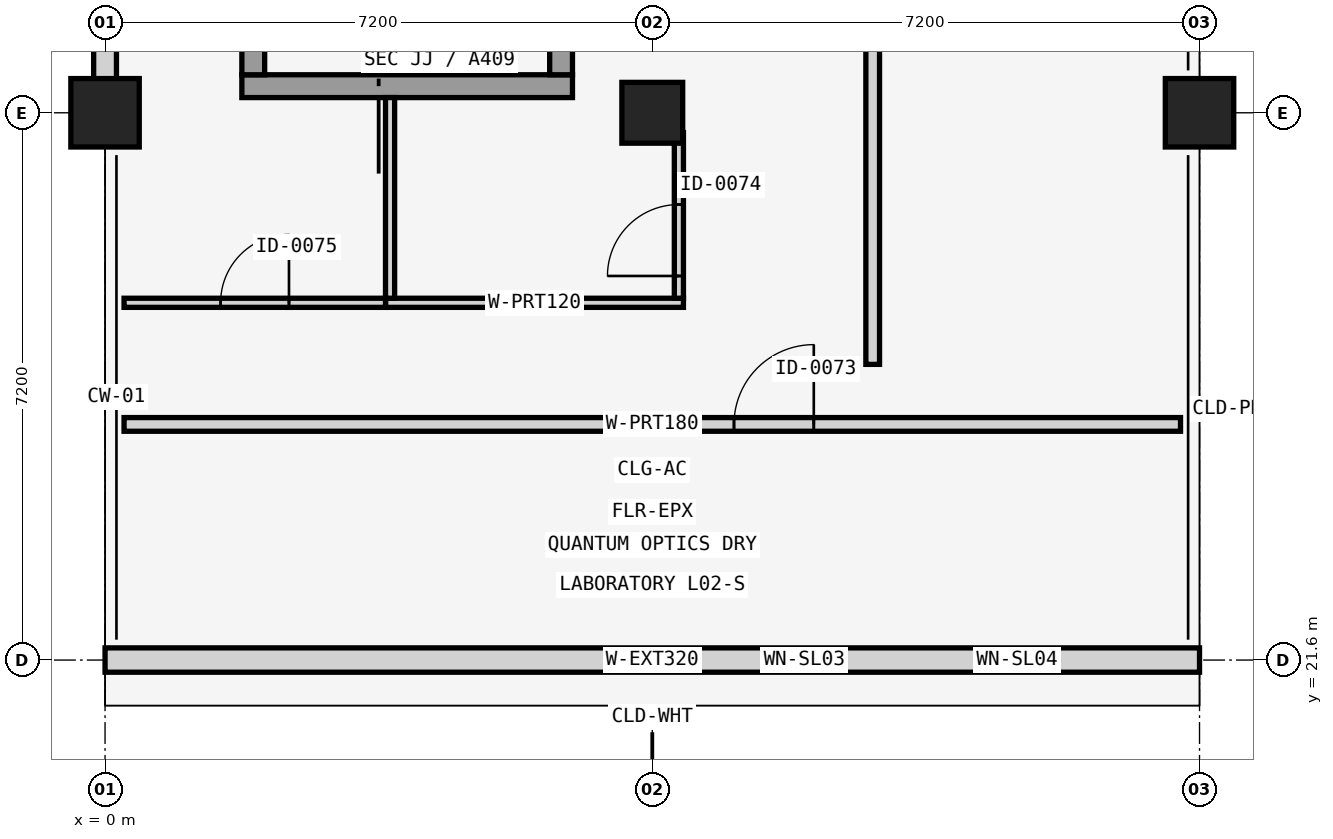
"""IFC4 building model, lengths in metres.
Left out: names, types, materials, properties, quantities, classifications, styles, units other than length and angle.
Written with IfcOpenShell. Run it as: python <this file> out.ifc"""

import sys

from ifc_helpers import new_model, si_unit, direction, frame, frame_2d, origin, origin_2d, place, context, subcontext, project, spatial, rectangle, extrude, element, fill, save


model = new_model("IFC4")
c1 = context("Model", 3, precision=1e-05, world=origin(), true_north=direction((0.0, 1.0)))
c2 = subcontext(c1, "Body", "Model", "MODEL_VIEW")
j1 = project(units=[si_unit("LENGTHUNIT", "METRE"), si_unit("PLANEANGLEUNIT", "RADIAN")], contexts=[c1])
p1 = place(None, origin())
s1 = spatial("IfcSite", under=j1, at=p1, CompositionType="ELEMENT")
p2 = place(p1, origin())
s2 = spatial("IfcBuilding", under=s1, at=p2, CompositionType="ELEMENT")
p3 = place(p2, frame((0.0, 0.0, 8.96)))
s3 = spatial("IfcBuildingStorey", under=s2, at=p3, CompositionType="ELEMENT", Elevation=8.96)
p4 = place(p3, frame((0.0, 28.8, 0.0), z_axis=(0.0, 0.0, 1.0), x_axis=(1.0, 0.0, 0.0)))
e1 = element("IfcColumn", 1, at=p4, inside=s3, PredefinedType="COLUMN", context=c2, shape_type="SweptSolid", body=[
    extrude(rectangle(XDim=0.9, YDim=0.9, at=origin_2d()), origin(), (0.0, 0.0, 1.0), 4.16),
])
p5 = place(p3, frame((7.2, 28.8, 0.0), z_axis=(0.0, 0.0, 1.0), x_axis=(1.0, 0.0, 0.0)))
e2 = element("IfcColumn", 2, at=p5, inside=s3, PredefinedType="COLUMN", context=c2, shape_type="SweptSolid", body=[
    extrude(rectangle(XDim=0.8, YDim=0.8, at=origin_2d()), origin(), (0.0, 0.0, 1.0), 4.16),
])
p6 = place(p3, frame((14.4, 28.8, 0.0), z_axis=(0.0, 0.0, 1.0), x_axis=(1.0, 0.0, 0.0)))
e3 = element("IfcColumn", 3, at=p6, inside=s3, PredefinedType="COLUMN", context=c2, shape_type="SweptSolid", body=[
    extrude(rectangle(XDim=0.9, YDim=0.9, at=origin_2d()), origin(), (0.0, 0.0, 1.0), 4.16),
])
p7 = place(p3, frame((0.0, 21.6, 0.0), z_axis=(0.0, 0.0, 1.0), x_axis=(1.0, 0.0, 0.0)))
e4 = element("IfcWall", 4, at=p7, inside=s3, PredefinedType="SOLIDWALL", context=c2, shape_type="SweptSolid", body=[
    extrude(rectangle(XDim=14.4, YDim=0.32, at=frame_2d((7.2, 0.0))), origin(), (0.0, 0.0, 1.0), 2.81),
])
p8 = place(p7, frame((8.925, 0.0, 0.45)))
e5 = element("IfcOpeningElement", 5, at=p8, cuts=e4, PredefinedType="OPENING", context=c2, shape_type="SweptSolid", body=[
    extrude(rectangle(XDim=0.55, YDim=2.2, at=frame_2d((0.275, 1.1))), frame((0.0, 0.17, 0.0), z_axis=(0.0, -1.0, 0.0), x_axis=(1.0, 0.0, 0.0)), (0.0, 0.0, 1.0), 0.34),
])
p9 = place(p7, frame((11.775, 0.0, 0.55)))
e6 = element("IfcOpeningElement", 6, at=p9, cuts=e4, PredefinedType="OPENING", context=c2, shape_type="SweptSolid", body=[
    extrude(rectangle(XDim=0.45, YDim=2.1, at=frame_2d((0.225, 1.05))), frame((0.0, 0.17, 0.0), z_axis=(0.0, -1.0, 0.0), x_axis=(1.0, 0.0, 0.0)), (0.0, 0.0, 1.0), 0.34),
])
p10 = place(p3, frame((0.0, 29.24, 0.0), z_axis=(0.0, 0.0, 1.0), x_axis=(0.0, 1.0, 0.0)))
e7 = element("IfcWall", 7, at=p10, inside=s3, PredefinedType="SOLIDWALL", context=c2, shape_type="SweptSolid", body=[
    extrude(rectangle(XDim=6.32, YDim=0.3, at=frame_2d((3.16, 0.0))), origin(), (0.0, 0.0, 1.0), 2.81),
])
p11 = place(p3, frame((1.8, 29.15, 0.0), z_axis=(0.0, 0.0, 1.0), x_axis=(1.0, 0.0, 0.0)))
e8 = element("IfcWall", 8, at=p11, inside=s3, PredefinedType="SHEAR", context=c2, shape_type="SweptSolid", body=[
    extrude(rectangle(XDim=4.35, YDim=0.3, at=frame_2d((2.175, 0.0))), origin(), (0.0, 0.0, 1.0), 3.81),
])
p12 = place(p3, frame((1.95, 29.3, 0.0), z_axis=(0.0, 0.0, 1.0), x_axis=(0.0, 1.0, 0.0)))
e9 = element("IfcWall", 9, at=p12, inside=s3, PredefinedType="SHEAR", context=c2, shape_type="SweptSolid", body=[
    extrude(rectangle(XDim=7.8, YDim=0.3, at=frame_2d((3.9, 0.0))), origin(), (0.0, 0.0, 1.0), 3.81),
])
p13 = place(p3, frame((6.0, 29.3, 0.0), z_axis=(0.0, 0.0, 1.0), x_axis=(0.0, 1.0, 0.0)))
e10 = element("IfcWall", 10, at=p13, inside=s3, PredefinedType="SHEAR", context=c2, shape_type="SweptSolid", body=[
    extrude(rectangle(XDim=7.8, YDim=0.3, at=frame_2d((3.9, 0.0))), origin(), (0.0, 0.0, 1.0), 3.81),
])
p14 = place(p13, frame((0.4, 0.0, 0.0)))
e11 = element("IfcOpeningElement", 11, at=p14, cuts=e10, PredefinedType="OPENING", context=c2, shape_type="SweptSolid", body=[
    extrude(rectangle(XDim=1.15, YDim=2.2, at=frame_2d((0.575, 1.1))), frame((0.0, 0.16, 0.0), z_axis=(0.0, -1.0, 0.0), x_axis=(1.0, 0.0, 0.0)), (0.0, 0.0, 1.0), 0.32),
])
p15 = place(p3, frame((0.25, 24.7, 0.0), z_axis=(0.0, 0.0, 1.0), x_axis=(1.0, 0.0, 0.0)))
e12 = element("IfcWall", 12, at=p15, inside=s3, PredefinedType="PARTITIONING", context=c2, shape_type="SweptSolid", body=[
    extrude(rectangle(XDim=13.9, YDim=0.18, at=frame_2d((6.95, 0.0))), origin(), (0.0, 0.0, 1.0), 2.81),
])
p16 = place(p15, frame((8.025, 0.0, 0.0)))
e13 = element("IfcOpeningElement", 13, at=p16, cuts=e12, PredefinedType="OPENING", context=c2, shape_type="SweptSolid", body=[
    extrude(rectangle(XDim=1.05, YDim=2.15, at=frame_2d((0.525, 1.075))), frame((0.0, 0.1, 0.0), z_axis=(0.0, -1.0, 0.0), x_axis=(1.0, 0.0, 0.0)), (0.0, 0.0, 1.0), 0.2),
])
p17 = place(p3, frame((3.69, 26.3, 0.0), z_axis=(0.0, 0.0, 1.0), x_axis=(1.0, 0.0, 0.0)))
e14 = element("IfcWall", 14, at=p17, inside=s3, PredefinedType="PARTITIONING", context=c2, shape_type="SweptSolid", body=[
    extrude(rectangle(XDim=3.92, YDim=0.12, at=frame_2d((1.96, 0.0))), origin(), (0.0, 0.0, 1.0), 2.81),
])
p18 = place(p3, frame((3.75, 26.36, 0.0), z_axis=(0.0, 0.0, 1.0), x_axis=(0.0, 1.0, 0.0)))
e15 = element("IfcWall", 15, at=p18, inside=s3, PredefinedType="PARTITIONING", context=c2, shape_type="SweptSolid", body=[
    extrude(rectangle(XDim=2.64, YDim=0.12, at=frame_2d((1.32, 0.0))), origin(), (0.0, 0.0, 1.0), 3.21),
])
p19 = place(p3, frame((7.55, 26.36, 0.0), z_axis=(0.0, 0.0, 1.0), x_axis=(0.0, 1.0, 0.0)))
e16 = element("IfcWall", 16, at=p19, inside=s3, PredefinedType="PARTITIONING", context=c2, shape_type="SweptSolid", body=[
    extrude(rectangle(XDim=2.18, YDim=0.12, at=frame_2d((1.09, 0.0))), origin(), (0.0, 0.0, 1.0), 3.81),
])
p20 = place(p19, frame((0.293, 0.0, 0.0)))
e17 = element("IfcOpeningElement", 17, at=p20, cuts=e16, PredefinedType="OPENING", context=c2, shape_type="SweptSolid", body=[
    extrude(rectangle(XDim=0.94, YDim=2.1, at=frame_2d((0.47, 1.05))), frame((0.0, 0.07, 0.0), z_axis=(0.0, -1.0, 0.0), x_axis=(1.0, 0.0, 0.0)), (0.0, 0.0, 1.0), 0.14),
])
p21 = place(p3, frame((0.25, 26.3, 0.0), z_axis=(0.0, 0.0, 1.0), x_axis=(1.0, 0.0, 0.0)))
e18 = element("IfcWall", 18, at=p21, inside=s3, PredefinedType="PARTITIONING", context=c2, shape_type="SweptSolid", body=[
    extrude(rectangle(XDim=3.44, YDim=0.12, at=frame_2d((1.72, 0.0))), origin(), (0.0, 0.0, 1.0), 3.81),
])
p22 = place(p21, frame((1.27, 0.0, 0.0)))
e19 = element("IfcOpeningElement", 19, at=p22, cuts=e18, PredefinedType="OPENING", context=c2, shape_type="SweptSolid", body=[
    extrude(rectangle(XDim=0.9, YDim=2.1, at=frame_2d((0.45, 1.05))), frame((0.0, 0.07, 0.0), z_axis=(0.0, -1.0, 0.0), x_axis=(1.0, 0.0, 0.0)), (0.0, 0.0, 1.0), 0.14),
])
p23 = place(p3, frame((10.1, 25.49, 0.0), z_axis=(0.0, 0.0, 1.0), x_axis=(0.0, 1.0, 0.0)))
e20 = element("IfcWall", 20, at=p23, inside=s3, PredefinedType="PARTITIONING", context=c2, shape_type="SweptSolid", body=[
    extrude(rectangle(XDim=13.82, YDim=0.18, at=frame_2d((6.91, 0.0))), origin(), (0.0, 0.0, 1.0), 3.21),
])
p24 = place(p23, frame((6.45, 0.0, 0.0)))
e21 = element("IfcOpeningElement", 21, at=p24, cuts=e20, PredefinedType="OPENING", context=c2, shape_type="SweptSolid", body=[
    extrude(rectangle(XDim=0.92, YDim=2.1, at=frame_2d((0.46, 1.05))), frame((0.0, 0.1, 0.0), z_axis=(0.0, -1.0, 0.0), x_axis=(1.0, 0.0, 0.0)), (0.0, 0.0, 1.0), 0.2),
])
p25 = place(p8, origin())
e22 = element("IfcWindow", 22, at=p25, inside=s3, PartitioningType="SINGLE_PANEL", PredefinedType="WINDOW", context=c2, shape_type="SweptSolid", body=[
    extrude(rectangle(XDim=0.55, YDim=2.2, at=frame_2d((0.275, 1.1))), frame((0.0, 0.03, 0.0), z_axis=(0.0, -1.0, 0.0), x_axis=(1.0, 0.0, 0.0)), (0.0, 0.0, 1.0), 0.06),
])
fill(e5, e22)
p26 = place(p9, origin())
e23 = element("IfcWindow", 23, at=p26, inside=s3, PartitioningType="SINGLE_PANEL", PredefinedType="WINDOW", context=c2, shape_type="SweptSolid", body=[
    extrude(rectangle(XDim=0.45, YDim=2.1, at=frame_2d((0.225, 1.05))), frame((0.0, 0.03, 0.0), z_axis=(0.0, -1.0, 0.0), x_axis=(1.0, 0.0, 0.0)), (0.0, 0.0, 1.0), 0.06),
])
fill(e6, e23)
p27 = place(p16, origin())
e24 = element("IfcDoor", 24, at=p27, inside=s3, OperationType="SINGLE_SWING_RIGHT", PredefinedType="DOOR", context=c2, shape_type="SweptSolid", body=[
    extrude(rectangle(XDim=1.05, YDim=2.15, at=frame_2d((0.525, 1.075))), frame((0.0, 0.025, 0.0), z_axis=(0.0, -1.0, 0.0), x_axis=(1.0, 0.0, 0.0)), (0.0, 0.0, 1.0), 0.05),
])
fill(e13, e24)
p28 = place(p20, frame((0.94, 0.0, 0.0), z_axis=(0.0, 0.0, 1.0), x_axis=(-1.0, 0.0, 0.0)))
e25 = element("IfcDoor", 25, at=p28, inside=s3, OperationType="SINGLE_SWING_LEFT", PredefinedType="DOOR", context=c2, shape_type="SweptSolid", body=[
    extrude(rectangle(XDim=0.94, YDim=2.1, at=frame_2d((0.47, 1.05))), frame((0.0, 0.025, 0.0), z_axis=(0.0, -1.0, 0.0), x_axis=(1.0, 0.0, 0.0)), (0.0, 0.0, 1.0), 0.05),
])
fill(e17, e25)
p29 = place(p22, origin())
e26 = element("IfcDoor", 26, at=p29, inside=s3, OperationType="SINGLE_SWING_RIGHT", PredefinedType="DOOR", context=c2, shape_type="SweptSolid", body=[
    extrude(rectangle(XDim=0.9, YDim=2.1, at=frame_2d((0.45, 1.05))), frame((0.0, 0.025, 0.0), z_axis=(0.0, -1.0, 0.0), x_axis=(1.0, 0.0, 0.0)), (0.0, 0.0, 1.0), 0.05),
])
fill(e19, e26)
save(model, sys.argv[1])
